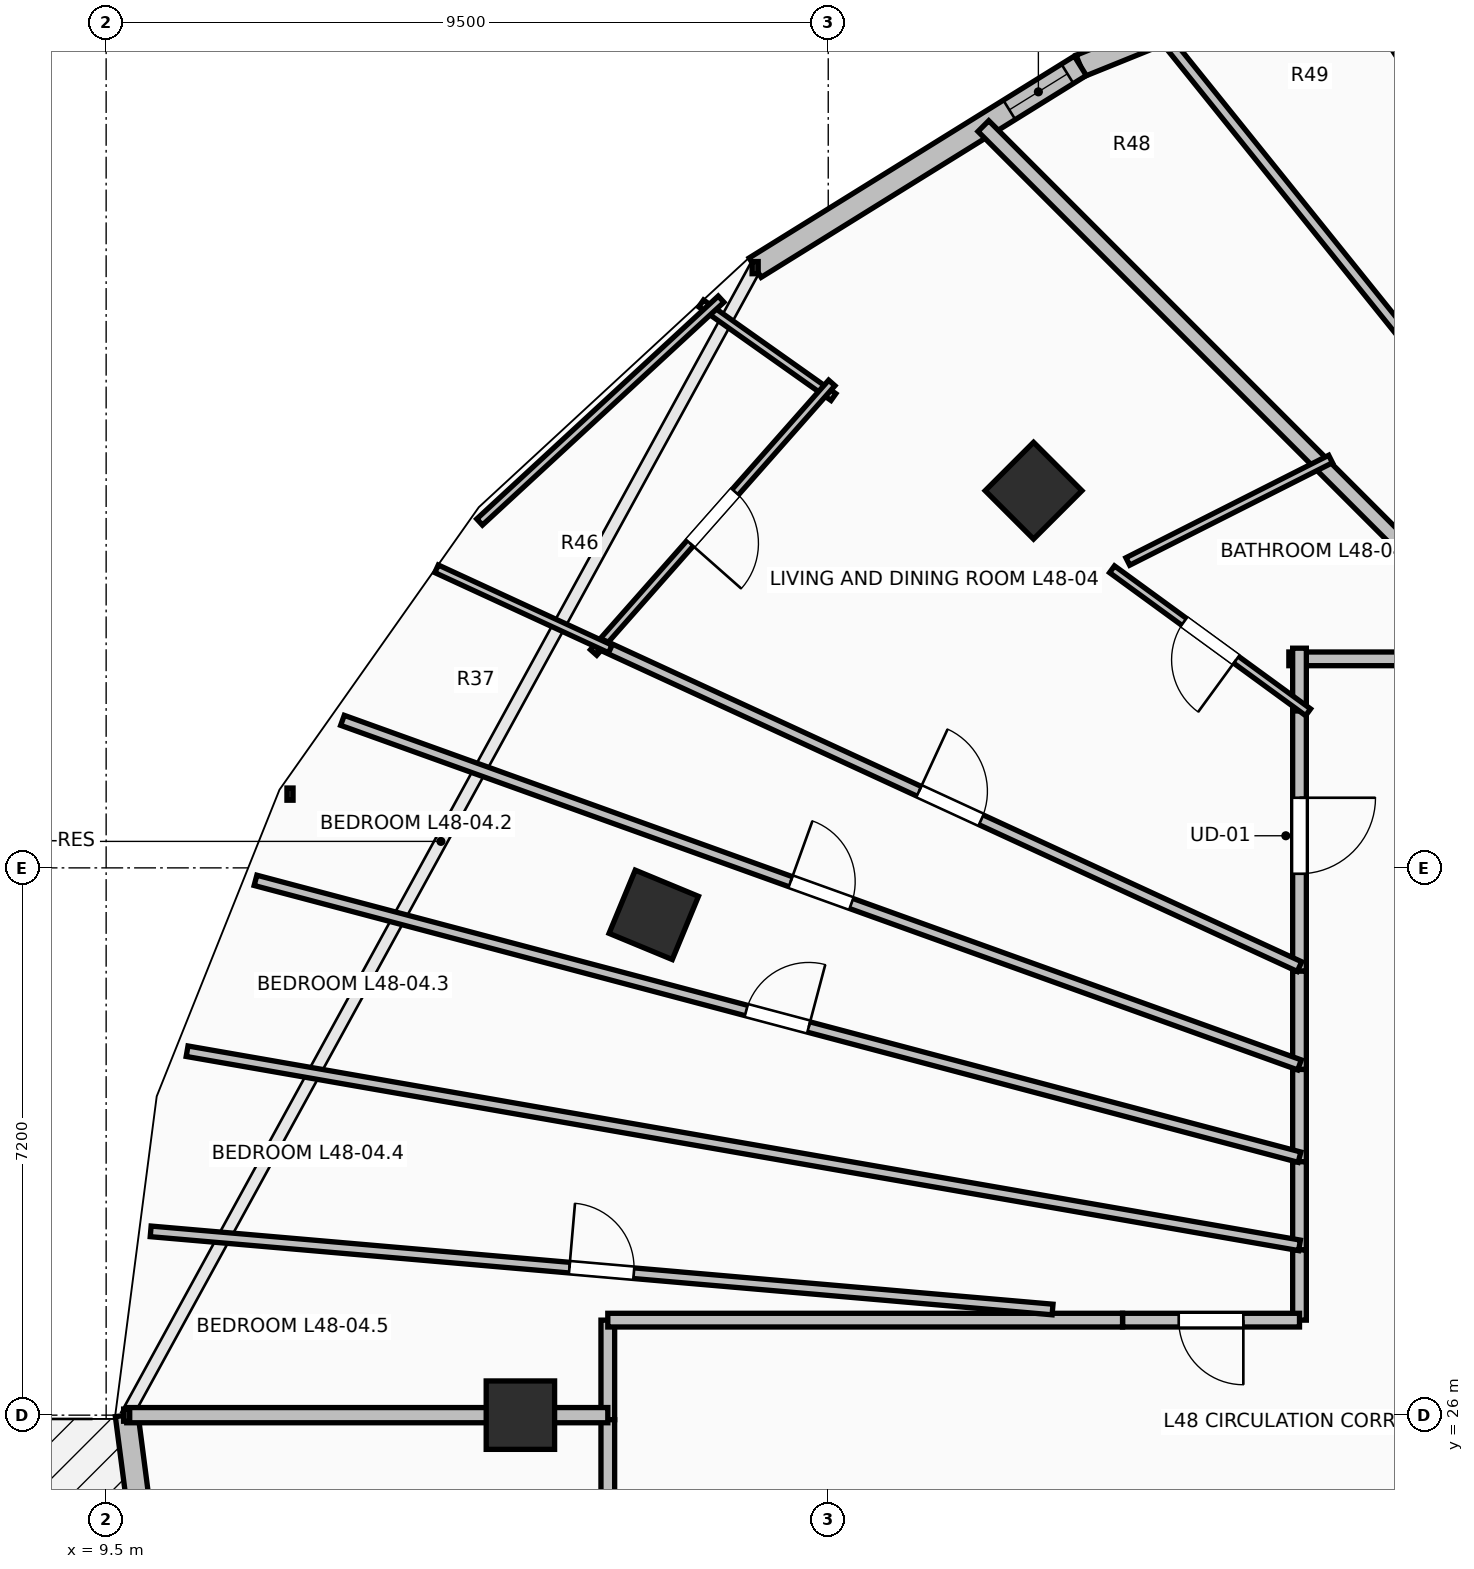
"""IFC4 building model, lengths in metres.
Left out: names, types, materials, properties, quantities, classifications, styles, units other than length and angle.
Written with IfcOpenShell. Run it as: python <this file> out.ifc"""

import sys

from ifc_helpers import new_model, si_unit, direction, frame, frame_2d, origin, origin_2d, place, context, subcontext, project, spatial, rectangle, extrude, element, fill, save


model = new_model("IFC4")
c1 = context("Model", 3, precision=1e-05, world=origin(), true_north=direction((0.0, 1.0)))
c2 = subcontext(c1, "Body", "Model", "MODEL_VIEW")
j1 = project(units=[si_unit("LENGTHUNIT", "METRE"), si_unit("PLANEANGLEUNIT", "RADIAN")], contexts=[c1])
p1 = place(None, origin())
s1 = spatial("IfcSite", under=j1, at=p1, CompositionType="ELEMENT")
p2 = place(p1, origin())
s2 = spatial("IfcBuilding", under=s1, at=p2, CompositionType="ELEMENT")
p3 = place(p2, frame((0.0, 0.0, 179.1)))
s3 = spatial("IfcBuildingStorey", under=s2, at=p3, CompositionType="ELEMENT", Elevation=179.1)
for number, where, z_axis, x_axis in (
    (1, (21.701, 38.162, 0.0), (0.0, 0.0, 1.0), (-0.707, 0.707, 0.0)),
    (2, (16.705, 32.582, 0.0), (0.0, 0.0, 1.0), (-0.924, 0.383, 0.0)),
    (3, (14.95, 26.0, 0.0), (0.0, 0.0, 1.0), (-1.0, 0.0, 0.0)),
):
    element("IfcColumn", number, at=place(p3, frame(where, z_axis=z_axis, x_axis=x_axis)), inside=s3, PredefinedType="COLUMN", context=c2, shape_type="SweptSolid", body=[
        extrude(rectangle(XDim=0.9, YDim=0.9, at=origin_2d()), origin(), (0.0, 0.0, 1.0), 3.5),
    ])
p4 = place(p3, frame((27.197, 45.725, 0.0), z_axis=(0.0, 0.0, 1.0), x_axis=(-0.927111094334, -0.374786630981, 0.0)))
e4 = element("IfcWall", 4, at=p4, inside=s3, PredefinedType="STANDARD", context=c2, shape_type="SweptSolid", body=[
    extrude(rectangle(XDim=5.264, YDim=0.3, at=frame_2d((2.632, 0.0))), origin(), (0.0, 0.0, 1.0), 3.24),
])
p5 = place(p4, frame((0.258, 0.0, 0.85)))
e5 = element("IfcOpeningElement", 5, at=p5, cuts=e4, PredefinedType="OPENING", context=c2, shape_type="SweptSolid", body=[
    extrude(rectangle(XDim=0.9, YDim=1.8, at=frame_2d((0.45, 0.9))), frame((0.0, 0.165, 0.0), z_axis=(0.0, -1.0, 0.0), x_axis=(1.0, 0.0, 0.0)), (0.0, 0.0, 1.0), 0.33),
])
p6 = place(p4, frame((2.032, 0.0, 0.85)))
e6 = element("IfcOpeningElement", 6, at=p6, cuts=e4, PredefinedType="OPENING", context=c2, shape_type="SweptSolid", body=[
    extrude(rectangle(XDim=1.2, YDim=1.95, at=frame_2d((0.6, 0.975))), frame((0.0, 0.165, 0.0), z_axis=(0.0, -1.0, 0.0), x_axis=(1.0, 0.0, 0.0)), (0.0, 0.0, 1.0), 0.33),
])
p7 = place(p3, frame((22.316, 43.752, 0.0), z_axis=(0.0, 0.0, 1.0), x_axis=(-0.849647657754, -0.527350791858, 0.0)))
e7 = element("IfcWall", 7, at=p7, inside=s3, PredefinedType="STANDARD", context=c2, shape_type="SweptSolid", body=[
    extrude(rectangle(XDim=5.035, YDim=0.3, at=frame_2d((2.518, 0.0))), origin(), (0.0, 0.0, 1.0), 3.24),
])
p8 = place(p7, frame((0.199, 0.0, 0.85)))
e8 = element("IfcOpeningElement", 8, at=p8, cuts=e7, PredefinedType="OPENING", context=c2, shape_type="SweptSolid", body=[
    extrude(rectangle(XDim=0.9, YDim=1.8, at=frame_2d((0.45, 0.9))), frame((0.0, 0.165, 0.0), z_axis=(0.0, -1.0, 0.0), x_axis=(1.0, 0.0, 0.0)), (0.0, 0.0, 1.0), 0.33),
])
p9 = place(p3, frame((9.77, 26.0, 0.0), z_axis=(0.0, 0.0, 1.0), x_axis=(0.129147853268, -0.991625348605, 0.0)))
e9 = element("IfcWall", 9, at=p9, inside=s3, PredefinedType="STANDARD", context=c2, shape_type="SweptSolid", body=[
    extrude(rectangle(XDim=4.2, YDim=0.3, at=frame_2d((2.1, 0.0))), origin(), (0.0, 0.0, 1.0), 3.24),
])
p10 = place(p9, frame((1.3, 0.0, 0.0)))
e10 = element("IfcOpeningElement", 10, at=p10, cuts=e9, PredefinedType="OPENING", context=c2, shape_type="SweptSolid", body=[
    extrude(rectangle(XDim=1.6, YDim=2.3, at=frame_2d((0.8, 1.15))), frame((0.0, 0.165, 0.0), z_axis=(0.0, -1.0, 0.0), x_axis=(1.0, 0.0, 0.0)), (0.0, 0.0, 1.0), 0.33),
])
p11 = place(p3, frame((25.2, 35.404, 0.0), z_axis=(0.0, 0.0, 1.0), x_axis=(0.0, -1.0, 0.0)))
e11 = element("IfcWall", 11, at=p11, inside=s3, PredefinedType="PARTITIONING", context=c2, shape_type="SweptSolid", body=[
    extrude(rectangle(XDim=3.563, YDim=0.18, at=frame_2d((1.781, 0.0))), origin(), (0.0, 0.0, 1.0), 2.432),
])
p12 = place(p11, frame((1.281, 0.0, 0.0)))
e12 = element("IfcOpeningElement", 12, at=p12, cuts=e11, PredefinedType="OPENING", context=c2, shape_type="SweptSolid", body=[
    extrude(rectangle(XDim=1.0, YDim=2.15, at=frame_2d((0.5, 1.075))), frame((0.0, 0.105, 0.0), z_axis=(0.0, -1.0, 0.0), x_axis=(1.0, 0.0, 0.0)), (0.0, 0.0, 1.0), 0.21),
])
p13 = place(p3, frame((28.105, 35.95, 0.0), z_axis=(0.0, 0.0, 1.0), x_axis=(-1.0, 0.0, 0.0)))
e13 = element("IfcWall", 13, at=p13, inside=s3, PredefinedType="PARTITIONING", context=c2, shape_type="SweptSolid", body=[
    extrude(rectangle(XDim=3.045, YDim=0.18, at=frame_2d((1.522, 0.0))), origin(), (0.0, 0.0, 1.0), 2.432),
])
p14 = place(p3, frame((25.2, 36.09, 0.0), z_axis=(0.0, 0.0, 1.0), x_axis=(0.0, -1.0, 0.0)))
e14 = element("IfcWall", 14, at=p14, inside=s3, PredefinedType="PARTITIONING", context=c2, shape_type="SweptSolid", body=[
    extrude(rectangle(XDim=0.826, YDim=0.18, at=frame_2d((0.413, 0.0))), origin(), (0.0, 0.0, 1.0), 2.432),
])
p15 = place(p3, frame((25.2, 31.841, 0.0), z_axis=(0.0, 0.0, 1.0), x_axis=(0.0, -1.0, 0.0)))
e15 = element("IfcWall", 15, at=p15, inside=s3, PredefinedType="PARTITIONING", context=c2, shape_type="SweptSolid", body=[
    extrude(rectangle(XDim=1.293, YDim=0.18, at=frame_2d((0.646, 0.0))), origin(), (0.0, 0.0, 1.0), 3.24),
])
p16 = place(p3, frame((25.2, 30.548, 0.0), z_axis=(0.0, 0.0, 1.0), x_axis=(0.0, -1.0, 0.0)))
e16 = element("IfcWall", 16, at=p16, inside=s3, PredefinedType="PARTITIONING", context=c2, shape_type="SweptSolid", body=[
    extrude(rectangle(XDim=1.214, YDim=0.18, at=frame_2d((0.607, 0.0))), origin(), (0.0, 0.0, 1.0), 2.432),
])
p17 = place(p3, frame((25.2, 29.334, 0.0), z_axis=(0.0, 0.0, 1.0), x_axis=(0.0, -1.0, 0.0)))
e17 = element("IfcWall", 17, at=p17, inside=s3, PredefinedType="PARTITIONING", context=c2, shape_type="SweptSolid", body=[
    extrude(rectangle(XDim=1.16, YDim=0.18, at=frame_2d((0.58, 0.0))), origin(), (0.0, 0.0, 1.0), 2.432),
])
p18 = place(p3, frame((25.2, 28.174, 0.0), z_axis=(0.0, 0.0, 1.0), x_axis=(0.0, -1.0, 0.0)))
e18 = element("IfcWall", 18, at=p18, inside=s3, PredefinedType="PARTITIONING", context=c2, shape_type="SweptSolid", body=[
    extrude(rectangle(XDim=0.924, YDim=0.18, at=frame_2d((0.462, 0.0))), origin(), (0.0, 0.0, 1.0), 2.432),
])
p19 = place(p3, frame((25.2, 27.25, 0.0), z_axis=(0.0, 0.0, 1.0), x_axis=(-1.0, 0.0, 0.0)))
e19 = element("IfcWall", 19, at=p19, inside=s3, PredefinedType="PARTITIONING", context=c2, shape_type="SweptSolid", body=[
    extrude(rectangle(XDim=2.328, YDim=0.18, at=frame_2d((1.164, 0.0))), origin(), (0.0, 0.0, 1.0), 2.432),
])
p20 = place(p19, frame((0.739, 0.0, 0.0)))
e20 = element("IfcOpeningElement", 20, at=p20, cuts=e19, PredefinedType="OPENING", context=c2, shape_type="SweptSolid", body=[
    extrude(rectangle(XDim=0.85, YDim=2.1, at=frame_2d((0.425, 1.05))), frame((0.0, 0.105, 0.0), z_axis=(0.0, -1.0, 0.0), x_axis=(1.0, 0.0, 0.0)), (0.0, 0.0, 1.0), 0.21),
])
p21 = place(p3, frame((16.1, 27.25, 0.0), z_axis=(0.0, 0.0, 1.0), x_axis=(0.0, -1.0, 0.0)))
e21 = element("IfcWall", 21, at=p21, inside=s3, PredefinedType="PARTITIONING", context=c2, shape_type="SweptSolid", body=[
    extrude(rectangle(XDim=1.31, YDim=0.18, at=frame_2d((0.655, 0.0))), origin(), (0.0, 0.0, 1.0), 2.432),
])
p22 = place(p3, frame((22.872, 27.25, 0.0), z_axis=(0.0, 0.0, 1.0), x_axis=(-1.0, 0.0, 0.0)))
e22 = element("IfcWall", 22, at=p22, inside=s3, PredefinedType="PARTITIONING", context=c2, shape_type="SweptSolid", body=[
    extrude(rectangle(XDim=6.772, YDim=0.18, at=frame_2d((3.386, 0.0))), origin(), (0.0, 0.0, 1.0), 2.432),
])
p23 = place(p3, frame((16.1, 25.94, 0.0), z_axis=(0.0, 0.0, 1.0), x_axis=(0.0, -1.0, 0.0)))
e23 = element("IfcWall", 23, at=p23, inside=s3, PredefinedType="PARTITIONING", context=c2, shape_type="SweptSolid", body=[
    extrude(rectangle(XDim=1.39, YDim=0.18, at=frame_2d((0.695, 0.0))), origin(), (0.0, 0.0, 1.0), 2.432),
])
p24 = place(p3, frame((25.749, 45.138, 0.0), z_axis=(0.0, 0.0, 1.0), x_axis=(0.539168632786, -0.842197830335, 0.0)))
e24 = element("IfcWall", 24, at=p24, inside=s3, PredefinedType="PARTITIONING", context=c2, shape_type="SweptSolid", body=[
    extrude(rectangle(XDim=10.909, YDim=0.14, at=frame_2d((5.455, 0.0))), origin(), (0.0, 0.0, 1.0), 2.432),
])
p25 = place(p3, frame((23.378, 44.178, 0.0), z_axis=(0.0, 0.0, 1.0), x_axis=(0.626756813732, -0.779214923137, 0.0)))
e25 = element("IfcWall", 25, at=p25, inside=s3, PredefinedType="PARTITIONING", context=c2, shape_type="SweptSolid", body=[
    extrude(rectangle(XDim=10.559, YDim=0.14, at=frame_2d((5.28, 0.0))), origin(), (0.0, 0.0, 1.0), 2.432),
])
p26 = place(p3, frame((21.041, 42.959, 0.0), z_axis=(0.0, 0.0, 1.0), x_axis=(0.707106781187, -0.707106781187, 0.0)))
e26 = element("IfcWall", 26, at=p26, inside=s3, PredefinedType="PARTITIONING", context=c2, shape_type="SweptSolid", body=[
    extrude(rectangle(XDim=9.912, YDim=0.2, at=frame_2d((4.956, 0.0))), origin(), (0.0, 0.0, 1.0), 2.432),
])
p27 = place(p3, frame((25.313, 35.248, 0.0), z_axis=(0.0, 0.0, 1.0), x_axis=(-0.807968083988, 0.58922625133, 0.0)))
e27 = element("IfcWall", 27, at=p27, inside=s3, PredefinedType="PARTITIONING", context=c2, shape_type="SweptSolid", body=[
    extrude(rectangle(XDim=3.192, YDim=0.11, at=frame_2d((1.596, 0.0))), origin(), (0.0, 0.0, 1.0), 2.432),
])
p28 = place(p27, frame((1.171, 0.0, 0.0)))
e28 = element("IfcOpeningElement", 28, at=p28, cuts=e27, PredefinedType="OPENING", context=c2, shape_type="SweptSolid", body=[
    extrude(rectangle(XDim=0.85, YDim=2.1, at=frame_2d((0.425, 1.05))), frame((0.0, 0.07, 0.0), z_axis=(0.0, -1.0, 0.0), x_axis=(1.0, 0.0, 0.0)), (0.0, 0.0, 1.0), 0.14),
])
p29 = place(p3, frame((22.941, 37.231, 0.0), z_axis=(0.0, 0.0, 1.0), x_axis=(0.892507731149, 0.451032094024, 0.0)))
e29 = element("IfcWall", 29, at=p29, inside=s3, PredefinedType="PARTITIONING", context=c2, shape_type="SweptSolid", body=[
    extrude(rectangle(XDim=2.989, YDim=0.11, at=frame_2d((1.495, 0.0))), origin(), (0.0, 0.0, 1.0), 2.432),
])
p30 = place(p3, frame((17.328, 40.626, 0.0), z_axis=(0.0, 0.0, 1.0), x_axis=(0.816262906602, -0.577680592807, 0.0)))
e30 = element("IfcWall", 30, at=p30, inside=s3, PredefinedType="PARTITIONING", context=c2, shape_type="SweptSolid", body=[
    extrude(rectangle(XDim=2.133, YDim=0.11, at=frame_2d((1.066, 0.0))), origin(), (0.0, 0.0, 1.0), 3.24),
])
p31 = place(p3, frame((19.047, 39.58, 0.0), z_axis=(0.0, 0.0, 1.0), x_axis=(-0.662189711464, -0.749336230294, 0.0)))
e31 = element("IfcWall", 31, at=p31, inside=s3, PredefinedType="PARTITIONING", context=c2, shape_type="SweptSolid", body=[
    extrude(rectangle(XDim=4.732, YDim=0.11, at=frame_2d((2.366, 0.0))), origin(), (0.0, 0.0, 1.0), 3.24),
])
p32 = place(p31, frame((1.916, 0.0, 0.0)))
e32 = element("IfcOpeningElement", 32, at=p32, cuts=e31, PredefinedType="OPENING", context=c2, shape_type="SweptSolid", body=[
    extrude(rectangle(XDim=0.9, YDim=2.1, at=frame_2d((0.45, 1.05))), frame((0.0, 0.07, 0.0), z_axis=(0.0, -1.0, 0.0), x_axis=(1.0, 0.0, 0.0)), (0.0, 0.0, 1.0), 0.14),
])
p33 = place(p3, frame((17.59, 40.682, 0.0), z_axis=(0.0, 0.0, 1.0), x_axis=(-0.734861902375, -0.678216768031, 0.0)))
e33 = element("IfcWall", 33, at=p33, inside=s3, PredefinedType="PARTITIONING", context=c2, shape_type="SweptSolid", body=[
    extrude(rectangle(XDim=4.323, YDim=0.11, at=frame_2d((2.162, 0.0))), origin(), (0.0, 0.0, 1.0), 3.24),
])
p34 = place(p3, frame((16.006, 36.139, 0.0), z_axis=(0.0, 0.0, 1.0), x_axis=(0.908157621609, -0.41862839645, 0.0)))
e34 = element("IfcWall", 34, at=p34, inside=s3, PredefinedType="PARTITIONING", context=c2, shape_type="SweptSolid", body=[
    extrude(rectangle(XDim=10.124, YDim=0.14, at=frame_2d((5.062, 0.0))), origin(), (0.0, 0.0, 1.0), 2.774),
])
p35 = place(p34, frame((4.612, 0.0, 0.0)))
e35 = element("IfcOpeningElement", 35, at=p35, cuts=e34, PredefinedType="OPENING", context=c2, shape_type="SweptSolid", body=[
    extrude(rectangle(XDim=0.9, YDim=2.1, at=frame_2d((0.45, 1.05))), frame((0.0, 0.085, 0.0), z_axis=(0.0, -1.0, 0.0), x_axis=(1.0, 0.0, 0.0)), (0.0, 0.0, 1.0), 0.17),
])
p36 = place(p3, frame((13.847, 37.135, 0.0), z_axis=(0.0, 0.0, 1.0), x_axis=(0.908101251341, -0.418750662462, 0.0)))
e36 = element("IfcWall", 36, at=p36, inside=s3, PredefinedType="PARTITIONING", context=c2, shape_type="SweptSolid", body=[
    extrude(rectangle(XDim=2.518, YDim=0.11, at=frame_2d((1.259, 0.0))), origin(), (0.0, 0.0, 1.0), 3.24),
])
p37 = place(p3, frame((12.609, 35.141, 0.0), z_axis=(0.0, 0.0, 1.0), x_axis=(0.940877411069, -0.338747246985, 0.0)))
e37 = element("IfcWall", 37, at=p37, inside=s3, PredefinedType="PARTITIONING", context=c2, shape_type="SweptSolid", body=[
    extrude(rectangle(XDim=13.382, YDim=0.14, at=frame_2d((6.691, 0.0))), origin(), (0.0, 0.0, 1.0), 2.774),
])
p38 = place(p37, frame((6.266, 0.0, 0.0)))
e38 = element("IfcOpeningElement", 38, at=p38, cuts=e37, PredefinedType="OPENING", context=c2, shape_type="SweptSolid", body=[
    extrude(rectangle(XDim=0.85, YDim=2.1, at=frame_2d((0.425, 1.05))), frame((0.0, 0.085, 0.0), z_axis=(0.0, -1.0, 0.0), x_axis=(1.0, 0.0, 0.0)), (0.0, 0.0, 1.0), 0.17),
])
p39 = place(p3, frame((11.465, 33.036, 0.0), z_axis=(0.0, 0.0, 1.0), x_axis=(0.966598137313, -0.256296782934, 0.0)))
e39 = element("IfcWall", 39, at=p39, inside=s3, PredefinedType="PARTITIONING", context=c2, shape_type="SweptSolid", body=[
    extrude(rectangle(XDim=14.209, YDim=0.14, at=frame_2d((7.105, 0.0))), origin(), (0.0, 0.0, 1.0), 2.432),
])
p40 = place(p39, frame((6.68, 0.0, 0.0)))
e40 = element("IfcOpeningElement", 40, at=p40, cuts=e39, PredefinedType="OPENING", context=c2, shape_type="SweptSolid", body=[
    extrude(rectangle(XDim=0.85, YDim=2.1, at=frame_2d((0.425, 1.05))), frame((0.0, 0.085, 0.0), z_axis=(0.0, -1.0, 0.0), x_axis=(1.0, 0.0, 0.0)), (0.0, 0.0, 1.0), 0.17),
])
p41 = place(p3, frame((10.565, 30.788, 0.0), z_axis=(0.0, 0.0, 1.0), x_axis=(0.985109541297, -0.171927867563, 0.0)))
e41 = element("IfcWall", 41, at=p41, inside=s3, PredefinedType="PARTITIONING", context=c2, shape_type="SweptSolid", body=[
    extrude(rectangle(XDim=14.856, YDim=0.14, at=frame_2d((7.428, 0.0))), origin(), (0.0, 0.0, 1.0), 2.774),
])
p42 = place(p3, frame((10.086, 28.418, 0.0), z_axis=(0.0, 0.0, 1.0), x_axis=(0.996267232338, -0.08632266081, 0.0)))
e42 = element("IfcWall", 42, at=p42, inside=s3, PredefinedType="PARTITIONING", context=c2, shape_type="SweptSolid", body=[
    extrude(rectangle(XDim=11.91, YDim=0.14, at=frame_2d((5.955, 0.0))), origin(), (0.0, 0.0, 1.0), 2.432),
])
p43 = place(p42, frame((5.53, 0.0, 0.0)))
e43 = element("IfcOpeningElement", 43, at=p43, cuts=e42, PredefinedType="OPENING", context=c2, shape_type="SweptSolid", body=[
    extrude(rectangle(XDim=0.85, YDim=2.1, at=frame_2d((0.425, 1.05))), frame((0.0, 0.085, 0.0), z_axis=(0.0, -1.0, 0.0), x_axis=(1.0, 0.0, 0.0)), (0.0, 0.0, 1.0), 0.17),
])
p44 = place(p3, frame((9.771, 26.0, 0.0), z_axis=(0.0, 0.0, 1.0), x_axis=(1.0, 0.0, 0.0)))
e44 = element("IfcWall", 44, at=p44, inside=s3, PredefinedType="PARTITIONING", context=c2, shape_type="SweptSolid", body=[
    extrude(rectangle(XDim=6.329, YDim=0.2, at=frame_2d((3.165, 0.0))), origin(), (0.0, 0.0, 1.0), 2.432),
])
p45 = place(p8, origin())
e45 = element("IfcWindow", 45, at=p45, inside=s3, PartitioningType="SINGLE_PANEL", PredefinedType="WINDOW", context=c2, shape_type="SweptSolid", body=[
    extrude(rectangle(XDim=0.9, YDim=1.8, at=frame_2d((0.45, 0.9))), frame((0.0, 0.03, 0.0), z_axis=(0.0, -1.0, 0.0), x_axis=(1.0, 0.0, 0.0)), (0.0, 0.0, 1.0), 0.06),
])
fill(e8, e45)
p46 = place(p12, origin())
e46 = element("IfcDoor", 46, at=p46, inside=s3, OperationType="SINGLE_SWING_LEFT", PredefinedType="DOOR", context=c2, shape_type="SweptSolid", body=[
    extrude(rectangle(XDim=1.0, YDim=2.15, at=frame_2d((0.5, 1.075))), frame((0.0, 0.025, 0.0), z_axis=(0.0, -1.0, 0.0), x_axis=(1.0, 0.0, 0.0)), (0.0, 0.0, 1.0), 0.05),
])
fill(e12, e46)
p47 = place(p28, origin())
e47 = element("IfcDoor", 47, at=p47, inside=s3, OperationType="SINGLE_SWING_LEFT", PredefinedType="DOOR", context=c2, shape_type="SweptSolid", body=[
    extrude(rectangle(XDim=0.85, YDim=2.1, at=frame_2d((0.425, 1.05))), frame((0.0, 0.025, 0.0), z_axis=(0.0, -1.0, 0.0), x_axis=(1.0, 0.0, 0.0)), (0.0, 0.0, 1.0), 0.05),
])
fill(e28, e47)
p48 = place(p32, origin())
e48 = element("IfcDoor", 48, at=p48, inside=s3, OperationType="SINGLE_SWING_RIGHT", PredefinedType="DOOR", context=c2, shape_type="SweptSolid", body=[
    extrude(rectangle(XDim=0.9, YDim=2.1, at=frame_2d((0.45, 1.05))), frame((0.0, 0.025, 0.0), z_axis=(0.0, -1.0, 0.0), x_axis=(1.0, 0.0, 0.0)), (0.0, 0.0, 1.0), 0.05),
])
fill(e32, e48)
p49 = place(p35, origin())
e49 = element("IfcDoor", 49, at=p49, inside=s3, OperationType="SINGLE_SWING_LEFT", PredefinedType="DOOR", context=c2, shape_type="SweptSolid", body=[
    extrude(rectangle(XDim=0.9, YDim=2.1, at=frame_2d((0.45, 1.05))), frame((0.0, 0.025, 0.0), z_axis=(0.0, -1.0, 0.0), x_axis=(1.0, 0.0, 0.0)), (0.0, 0.0, 1.0), 0.05),
])
fill(e35, e49)
p50 = place(p20, origin())
e50 = element("IfcDoor", 50, at=p50, inside=s3, OperationType="SINGLE_SWING_LEFT", PredefinedType="DOOR", context=c2, shape_type="SweptSolid", body=[
    extrude(rectangle(XDim=0.85, YDim=2.1, at=frame_2d((0.425, 1.05))), frame((0.0, 0.025, 0.0), z_axis=(0.0, -1.0, 0.0), x_axis=(1.0, 0.0, 0.0)), (0.0, 0.0, 1.0), 0.05),
])
fill(e20, e50)
p51 = place(p38, origin())
e51 = element("IfcDoor", 51, at=p51, inside=s3, OperationType="SINGLE_SWING_LEFT", PredefinedType="DOOR", context=c2, shape_type="SweptSolid", body=[
    extrude(rectangle(XDim=0.85, YDim=2.1, at=frame_2d((0.425, 1.05))), frame((0.0, 0.025, 0.0), z_axis=(0.0, -1.0, 0.0), x_axis=(1.0, 0.0, 0.0)), (0.0, 0.0, 1.0), 0.05),
])
fill(e38, e51)
p52 = place(p40, origin())
e52 = element("IfcDoor", 52, at=p52, inside=s3, OperationType="SINGLE_SWING_RIGHT", PredefinedType="DOOR", context=c2, shape_type="SweptSolid", body=[
    extrude(rectangle(XDim=0.85, YDim=2.1, at=frame_2d((0.425, 1.05))), frame((0.0, 0.025, 0.0), z_axis=(0.0, -1.0, 0.0), x_axis=(1.0, 0.0, 0.0)), (0.0, 0.0, 1.0), 0.05),
])
fill(e40, e52)
p53 = place(p43, origin())
e53 = element("IfcDoor", 53, at=p53, inside=s3, OperationType="SINGLE_SWING_LEFT", PredefinedType="DOOR", context=c2, shape_type="SweptSolid", body=[
    extrude(rectangle(XDim=0.85, YDim=2.1, at=frame_2d((0.425, 1.05))), frame((0.0, 0.025, 0.0), z_axis=(0.0, -1.0, 0.0), x_axis=(1.0, 0.0, 0.0)), (0.0, 0.0, 1.0), 0.05),
])
fill(e43, e53)
save(model, sys.argv[1])
